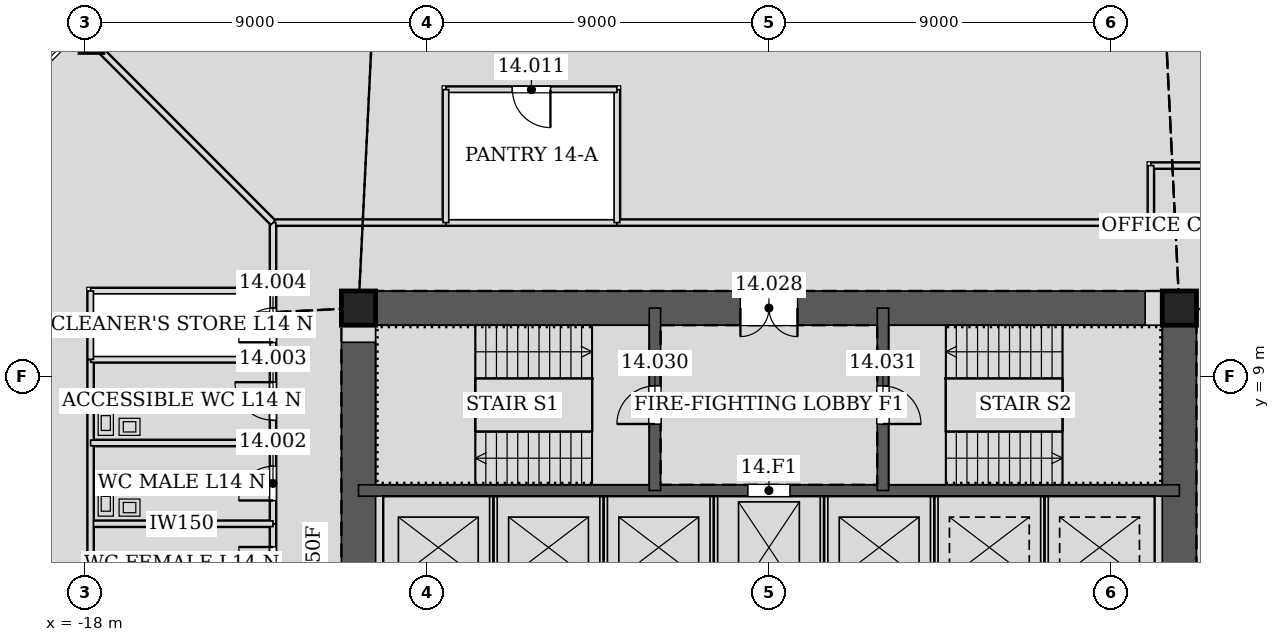
"""IFC4 building model, lengths in metres.
Left out: names, types, materials, properties, quantities, classifications, styles, units other than length and angle.
Written with IfcOpenShell. Run it as: python <this file> out.ifc"""

import sys

from ifc_helpers import new_model, si_unit, direction, frame, frame_2d, origin, origin_2d, place, context, subcontext, project, spatial, rectangle, hollow_rectangle, extrude, element, fill, save


model = new_model("IFC4")
c1 = context("Model", 3, precision=1e-05, world=origin(), true_north=direction((0.0, 1.0)))
c2 = subcontext(c1, "Body", "Model", "MODEL_VIEW")
j1 = project(units=[si_unit("LENGTHUNIT", "METRE"), si_unit("PLANEANGLEUNIT", "RADIAN")], contexts=[c1])
p1 = place(None, origin())
s1 = spatial("IfcSite", under=j1, at=p1, CompositionType="ELEMENT")
p2 = place(p1, origin())
s2 = spatial("IfcBuilding", under=s1, at=p2, CompositionType="ELEMENT")
p3 = place(p2, frame((0.0, 0.0, 66.6)))
s3 = spatial("IfcBuildingStorey", under=s2, at=p3, CompositionType="ELEMENT", Elevation=66.6)
p4 = place(p3, frame((-17.912, 17.912, 0.0), z_axis=(0.020046580746, -0.020046580746, 0.99959805382), x_axis=(0.707106781187, 0.707106781187, 0.0)))
e1 = element("IfcColumn", 1, at=p4, inside=s3, PredefinedType="COLUMN", context=c2, shape_type="SweptSolid", body=[
    extrude(hollow_rectangle(XDim=0.6, YDim=0.6, WallThickness=0.032, at=origin_2d()), origin(), (0.0, 0.0, 1.0), 4.202),
])
for number, where, z_axis, x_axis in (
    (2, (10.8, 10.8, 0.0), (0.0, 0.0, 1.0), (1.0, 0.0, 0.0)),
    (3, (-10.8, 10.8, 0.0), (0.0, 0.0, 1.0), (1.0, 0.0, 0.0)),
):
    element("IfcColumn", number, at=place(p3, frame(where, z_axis=z_axis, x_axis=x_axis)), inside=s3, PredefinedType="COLUMN", context=c2, shape_type="SweptSolid", body=[
        extrude(hollow_rectangle(XDim=0.9, YDim=0.9, WallThickness=0.06, at=origin_2d()), origin(), (0.0, 0.0, 1.0), 4.2),
    ])
p5 = place(p3, frame((10.8, -10.8, 0.0), z_axis=(0.0, 0.0, 1.0), x_axis=(0.0, 1.0, 0.0)))
e4 = element("IfcWall", 4, at=p5, inside=s3, PredefinedType="SOLIDWALL", context=c2, shape_type="SweptSolid", body=[
    extrude(rectangle(XDim=21.6, YDim=0.9, at=frame_2d((10.8, 0.0))), origin(), (0.0, 0.0, 1.0), 4.2),
])
p6 = place(p5, frame((11.7, 0.0, 0.0)))
e5 = element("IfcOpeningElement", 5, at=p6, cuts=e4, PredefinedType="OPENING", context=c2, shape_type="SweptSolid", body=[
    extrude(rectangle(XDim=1.2, YDim=2.1, at=frame_2d((0.6, 1.05))), frame((0.0, 0.46, 0.0), z_axis=(0.0, -1.0, 0.0), x_axis=(1.0, 0.0, 0.0)), (0.0, 0.0, 1.0), 0.92),
])
p7 = place(p5, frame((8.7, 0.0, 0.0)))
e6 = element("IfcOpeningElement", 6, at=p7, cuts=e4, PredefinedType="OPENING", context=c2, shape_type="SweptSolid", body=[
    extrude(rectangle(XDim=1.2, YDim=2.1, at=frame_2d((0.6, 1.05))), frame((0.0, 0.46, 0.0), z_axis=(0.0, -1.0, 0.0), x_axis=(1.0, 0.0, 0.0)), (0.0, 0.0, 1.0), 0.92),
])
p8 = place(p3, frame((10.8, 10.8, 0.0), z_axis=(0.0, 0.0, 1.0), x_axis=(-1.0, 0.0, 0.0)))
e7 = element("IfcWall", 7, at=p8, inside=s3, PredefinedType="SOLIDWALL", context=c2, shape_type="SweptSolid", body=[
    extrude(rectangle(XDim=21.6, YDim=0.9, at=frame_2d((10.8, 0.0))), origin(), (0.0, 0.0, 1.0), 4.2),
])
p9 = place(p8, frame((10.05, 0.0, 0.0)))
e8 = element("IfcOpeningElement", 8, at=p9, cuts=e7, PredefinedType="OPENING", context=c2, shape_type="SweptSolid", body=[
    extrude(rectangle(XDim=1.5, YDim=2.1, at=frame_2d((0.75, 1.05))), frame((0.0, 0.46, 0.0), z_axis=(0.0, -1.0, 0.0), x_axis=(1.0, 0.0, 0.0)), (0.0, 0.0, 1.0), 0.92),
])
p10 = place(p3, frame((-10.8, 10.8, 0.0), z_axis=(0.0, 0.0, 1.0), x_axis=(0.0, -1.0, 0.0)))
e9 = element("IfcWall", 9, at=p10, inside=s3, PredefinedType="SOLIDWALL", context=c2, shape_type="SweptSolid", body=[
    extrude(rectangle(XDim=21.6, YDim=0.9, at=frame_2d((10.8, 0.0))), origin(), (0.0, 0.0, 1.0), 4.2),
])
p11 = place(p10, frame((8.7, 0.0, 0.0)))
e10 = element("IfcOpeningElement", 10, at=p11, cuts=e9, PredefinedType="OPENING", context=c2, shape_type="SweptSolid", body=[
    extrude(rectangle(XDim=1.2, YDim=2.1, at=frame_2d((0.6, 1.05))), frame((0.0, 0.46, 0.0), z_axis=(0.0, -1.0, 0.0), x_axis=(1.0, 0.0, 0.0)), (0.0, 0.0, 1.0), 0.92),
])
p12 = place(p10, frame((11.7, 0.0, 0.0)))
e11 = element("IfcOpeningElement", 11, at=p12, cuts=e9, PredefinedType="OPENING", context=c2, shape_type="SweptSolid", body=[
    extrude(rectangle(XDim=1.2, YDim=2.1, at=frame_2d((0.6, 1.05))), frame((0.0, 0.46, 0.0), z_axis=(0.0, -1.0, 0.0), x_axis=(1.0, 0.0, 0.0)), (0.0, 0.0, 1.0), 0.92),
])
p13 = place(p3, frame((-10.8, 6.0, 0.0), z_axis=(0.0, 0.0, 1.0), x_axis=(1.0, 0.0, 0.0)))
e12 = element("IfcWall", 12, at=p13, inside=s3, PredefinedType="SOLIDWALL", context=c2, shape_type="SweptSolid", body=[
    extrude(rectangle(XDim=21.6, YDim=0.3, at=frame_2d((10.8, 0.0))), origin(), (0.0, 0.0, 1.0), 4.2),
])
p14 = place(p13, frame((10.25, 0.0, 0.0)))
e13 = element("IfcOpeningElement", 13, at=p14, cuts=e12, PredefinedType="OPENING", context=c2, shape_type="SweptSolid", body=[
    extrude(rectangle(XDim=1.1, YDim=2.1, at=frame_2d((0.55, 1.05))), frame((0.0, 0.16, 0.0), z_axis=(0.0, -1.0, 0.0), x_axis=(1.0, 0.0, 0.0)), (0.0, 0.0, 1.0), 0.32),
])
p15 = place(p3, frame((-3.0, 6.0, 0.0), z_axis=(0.0, 0.0, 1.0), x_axis=(0.0, 1.0, 0.0)))
e14 = element("IfcWall", 14, at=p15, inside=s3, PredefinedType="SOLIDWALL", context=c2, shape_type="SweptSolid", body=[
    extrude(rectangle(XDim=4.8, YDim=0.3, at=frame_2d((2.4, 0.0))), origin(), (0.0, 0.0, 1.0), 4.2),
])
p16 = place(p15, frame((1.75, 0.0, 0.0)))
e15 = element("IfcOpeningElement", 15, at=p16, cuts=e14, PredefinedType="OPENING", context=c2, shape_type="SweptSolid", body=[
    extrude(rectangle(XDim=1.0, YDim=2.1, at=frame_2d((0.5, 1.05))), frame((0.0, 0.16, 0.0), z_axis=(0.0, -1.0, 0.0), x_axis=(1.0, 0.0, 0.0)), (0.0, 0.0, 1.0), 0.32),
])
p17 = place(p3, frame((3.0, 6.0, 0.0), z_axis=(0.0, 0.0, 1.0), x_axis=(0.0, 1.0, 0.0)))
e16 = element("IfcWall", 16, at=p17, inside=s3, PredefinedType="SOLIDWALL", context=c2, shape_type="SweptSolid", body=[
    extrude(rectangle(XDim=4.8, YDim=0.3, at=frame_2d((2.4, 0.0))), origin(), (0.0, 0.0, 1.0), 4.2),
])
p18 = place(p17, frame((1.75, 0.0, 0.0)))
e17 = element("IfcOpeningElement", 17, at=p18, cuts=e16, PredefinedType="OPENING", context=c2, shape_type="SweptSolid", body=[
    extrude(rectangle(XDim=1.0, YDim=2.1, at=frame_2d((0.5, 1.05))), frame((0.0, 0.16, 0.0), z_axis=(0.0, -1.0, 0.0), x_axis=(1.0, 0.0, 0.0)), (0.0, 0.0, 1.0), 0.32),
])
p19 = place(p3, frame((-13.05, 5.126, 0.0), z_axis=(0.0, 0.0, 1.0), x_axis=(0.0, -1.0, 0.0)))
e18 = element("IfcWall", 18, at=p19, inside=s3, PredefinedType="PARTITIONING", context=c2, shape_type="SweptSolid", body=[
    extrude(rectangle(XDim=2.127, YDim=0.15, at=frame_2d((1.063, 0.0))), origin(), (0.0, 0.0, 1.0), 4.035),
])
p20 = place(p19, frame((0.614, 0.0, 0.0)))
e19 = element("IfcOpeningElement", 19, at=p20, cuts=e18, PredefinedType="OPENING", context=c2, shape_type="SweptSolid", body=[
    extrude(rectangle(XDim=0.9, YDim=2.1, at=frame_2d((0.45, 1.05))), frame((0.0, 0.085, 0.0), z_axis=(0.0, -1.0, 0.0), x_axis=(1.0, 0.0, 0.0)), (0.0, 0.0, 1.0), 0.17),
])
p21 = place(p3, frame((-13.05, 7.251, 0.0), z_axis=(0.0, 0.0, 1.0), x_axis=(0.0, -1.0, 0.0)))
e20 = element("IfcWall", 20, at=p21, inside=s3, PredefinedType="PARTITIONING", context=c2, shape_type="SweptSolid", body=[
    extrude(rectangle(XDim=2.127, YDim=0.15, at=frame_2d((1.063, 0.0))), origin(), (0.0, 0.0, 1.0), 4.035),
])
p22 = place(p21, frame((0.614, 0.0, 0.0)))
e21 = element("IfcOpeningElement", 21, at=p22, cuts=e20, PredefinedType="OPENING", context=c2, shape_type="SweptSolid", body=[
    extrude(rectangle(XDim=0.9, YDim=2.1, at=frame_2d((0.45, 1.05))), frame((0.0, 0.085, 0.0), z_axis=(0.0, -1.0, 0.0), x_axis=(1.0, 0.0, 0.0)), (0.0, 0.0, 1.0), 0.17),
])
p23 = place(p3, frame((-13.05, 9.451, 0.0), z_axis=(0.0, 0.0, 1.0), x_axis=(0.0, -1.0, 0.0)))
e22 = element("IfcWall", 22, at=p23, inside=s3, PredefinedType="PARTITIONING", context=c2, shape_type="SweptSolid", body=[
    extrude(rectangle(XDim=2.202, YDim=0.15, at=frame_2d((1.101, 0.0))), origin(), (0.0, 0.0, 1.0), 4.035),
])
p24 = place(p23, frame((0.601, 0.0, 0.0)))
e23 = element("IfcOpeningElement", 23, at=p24, cuts=e22, PredefinedType="OPENING", context=c2, shape_type="SweptSolid", body=[
    extrude(rectangle(XDim=1.0, YDim=2.1, at=frame_2d((0.5, 1.05))), frame((0.0, 0.085, 0.0), z_axis=(0.0, -1.0, 0.0), x_axis=(1.0, 0.0, 0.0)), (0.0, 0.0, 1.0), 0.17),
])
p25 = place(p3, frame((-13.05, 11.251, 0.0), z_axis=(0.0, 0.0, 1.0), x_axis=(0.0, -1.0, 0.0)))
e24 = element("IfcWall", 24, at=p25, inside=s3, PredefinedType="PARTITIONING", context=c2, shape_type="SweptSolid", body=[
    extrude(rectangle(XDim=1.802, YDim=0.15, at=frame_2d((0.901, 0.0))), origin(), (0.0, 0.0, 1.0), 3.014),
])
p26 = place(p25, frame((0.451, 0.0, 0.0)))
e25 = element("IfcOpeningElement", 25, at=p26, cuts=e24, PredefinedType="OPENING", context=c2, shape_type="SweptSolid", body=[
    extrude(rectangle(XDim=0.9, YDim=2.1, at=frame_2d((0.45, 1.05))), frame((0.0, 0.085, 0.0), z_axis=(0.0, -1.0, 0.0), x_axis=(1.0, 0.0, 0.0)), (0.0, 0.0, 1.0), 0.17),
])
p27 = place(p3, frame((-3.999, 13.05, 0.0), z_axis=(0.0, 0.0, 1.0), x_axis=(-1.0, 0.0, 0.0)))
e26 = element("IfcWall", 26, at=p27, inside=s3, PredefinedType="PARTITIONING", context=c2, shape_type="SweptSolid", body=[
    extrude(rectangle(XDim=4.502, YDim=0.15, at=frame_2d((2.251, 0.0))), origin(), (0.0, 0.0, 1.0), 4.035),
])
p28 = place(p3, frame((-8.499, 13.05, 0.0), z_axis=(0.0, 0.0, 1.0), x_axis=(-1.0, 0.0, 0.0)))
e27 = element("IfcWall", 27, at=p28, inside=s3, PredefinedType="PARTITIONING", context=c2, shape_type="SweptSolid", body=[
    extrude(rectangle(XDim=4.551, YDim=0.15, at=frame_2d((2.275, 0.0))), origin(), (0.0, 0.0, 1.0), 3.014),
])
p29 = place(p3, frame((14.55, 14.55, 0.0), z_axis=(0.0, 0.0, 1.0), x_axis=(-1.0, 0.0, 0.0)))
e28 = element("IfcWall", 28, at=p29, inside=s3, PredefinedType="PARTITIONING", context=c2, shape_type="SweptSolid", body=[
    extrude(rectangle(XDim=4.5, YDim=0.15, at=frame_2d((2.25, 0.0))), origin(), (0.0, 0.0, 1.0), 3.014),
])
p30 = place(p3, frame((10.05, 14.55, 0.0), z_axis=(0.0, 0.0, 1.0), x_axis=(0.0, -1.0, 0.0)))
e29 = element("IfcWall", 29, at=p30, inside=s3, PredefinedType="PARTITIONING", context=c2, shape_type="SweptSolid", body=[
    extrude(rectangle(XDim=1.5, YDim=0.15, at=frame_2d((0.75, 0.0))), origin(), (0.0, 0.0, 1.0), 3.423),
])
p31 = place(p3, frame((10.05, 13.05, 0.0), z_axis=(0.0, 0.0, 1.0), x_axis=(-1.0, 0.0, 0.0)))
e30 = element("IfcWall", 30, at=p31, inside=s3, PredefinedType="PARTITIONING", context=c2, shape_type="SweptSolid", body=[
    extrude(rectangle(XDim=14.051, YDim=0.15, at=frame_2d((7.025, 0.0))), origin(), (0.0, 0.0, 1.0), 3.065),
])
p32 = place(p3, frame((-13.05, 13.05, 0.0), z_axis=(0.0, 0.0, 1.0), x_axis=(0.0, -1.0, 0.0)))
e31 = element("IfcWall", 31, at=p32, inside=s3, PredefinedType="PARTITIONING", context=c2, shape_type="SweptSolid", body=[
    extrude(rectangle(XDim=1.801, YDim=0.15, at=frame_2d((0.9, 0.0))), origin(), (0.0, 0.0, 1.0), 3.167),
])
p33 = place(p3, frame((-13.05, 5.125, 0.0), z_axis=(0.0, 0.0, 1.0), x_axis=(-1.0, 0.0, 0.0)))
e32 = element("IfcWall", 32, at=p33, inside=s3, PredefinedType="PARTITIONING", context=c2, shape_type="SweptSolid", body=[
    extrude(rectangle(XDim=4.8, YDim=0.15, at=frame_2d((2.4, 0.0))), origin(), (0.0, 0.0, 1.0), 3.423),
])
p34 = place(p3, frame((-17.85, 3.0, 0.0), z_axis=(0.0, 0.0, 1.0), x_axis=(0.0, 1.0, 0.0)))
e33 = element("IfcWall", 33, at=p34, inside=s3, PredefinedType="PARTITIONING", context=c2, shape_type="SweptSolid", body=[
    extrude(rectangle(XDim=6.45, YDim=0.15, at=frame_2d((3.225, 0.0))), origin(), (0.0, 0.0, 1.0), 4.035),
])
for number, where, z_axis, x_axis in (
    (34, (-13.05, 7.25, 0.0), (0.0, 0.0, 1.0), (-1.0, 0.0, 0.0)),
    (35, (-13.05, 9.45, 0.0), (0.0, 0.0, 1.0), (-1.0, 0.0, 0.0)),
):
    element("IfcWall", number, at=place(p3, frame(where, z_axis=z_axis, x_axis=x_axis)), inside=s3, PredefinedType="PARTITIONING", context=c2, shape_type="SweptSolid", body=[
        extrude(rectangle(XDim=4.8, YDim=0.15, at=frame_2d((2.4, 0.0))), origin(), (0.0, 0.0, 1.0), 3.423),
    ])
p35 = place(p3, frame((-13.05, 11.25, 0.0), z_axis=(0.0, 0.0, 1.0), x_axis=(-1.0, 0.0, 0.0)))
e36 = element("IfcWall", 36, at=p35, inside=s3, PredefinedType="PARTITIONING", context=c2, shape_type="SweptSolid", body=[
    extrude(rectangle(XDim=4.8, YDim=0.15, at=frame_2d((2.4, 0.0))), origin(), (0.0, 0.0, 1.0), 3.715),
])
p36 = place(p3, frame((-17.85, 11.25, 0.0), z_axis=(0.0, 0.0, 1.0), x_axis=(0.0, -1.0, 0.0)))
e37 = element("IfcWall", 37, at=p36, inside=s3, PredefinedType="PARTITIONING", context=c2, shape_type="SweptSolid", body=[
    extrude(rectangle(XDim=1.8, YDim=0.15, at=frame_2d((0.9, 0.0))), origin(), (0.0, 0.0, 1.0), 3.014),
])
p37 = place(p3, frame((-4.0, 13.05, 0.0), z_axis=(0.0, 0.0, 1.0), x_axis=(0.0, 1.0, 0.0)))
e38 = element("IfcWall", 38, at=p37, inside=s3, PredefinedType="PARTITIONING", context=c2, shape_type="SweptSolid", body=[
    extrude(rectangle(XDim=3.5, YDim=0.15, at=frame_2d((1.75, 0.0))), origin(), (0.0, 0.0, 1.0), 3.423),
])
p38 = place(p3, frame((-4.0, 16.55, 0.0), z_axis=(0.0, 0.0, 1.0), x_axis=(-1.0, 0.0, 0.0)))
e39 = element("IfcWall", 39, at=p38, inside=s3, PredefinedType="PARTITIONING", context=c2, shape_type="SweptSolid", body=[
    extrude(rectangle(XDim=4.5, YDim=0.15, at=frame_2d((2.25, 0.0))), origin(), (0.0, 0.0, 1.0), 3.497),
])
p39 = place(p38, frame((1.75, 0.0, 0.0)))
e40 = element("IfcOpeningElement", 40, at=p39, cuts=e39, PredefinedType="OPENING", context=c2, shape_type="SweptSolid", body=[
    extrude(rectangle(XDim=1.0, YDim=2.1, at=frame_2d((0.5, 1.05))), frame((0.0, 0.085, 0.0), z_axis=(0.0, -1.0, 0.0), x_axis=(1.0, 0.0, 0.0)), (0.0, 0.0, 1.0), 0.17),
])
p40 = place(p3, frame((-8.5, 16.55, 0.0), z_axis=(0.0, 0.0, 1.0), x_axis=(0.0, -1.0, 0.0)))
e41 = element("IfcWall", 41, at=p40, inside=s3, PredefinedType="PARTITIONING", context=c2, shape_type="SweptSolid", body=[
    extrude(rectangle(XDim=3.5, YDim=0.15, at=frame_2d((1.75, 0.0))), origin(), (0.0, 0.0, 1.0), 3.423),
])
p41 = place(p3, frame((-17.602, 17.602, 0.0), z_axis=(0.0, 0.0, 1.0), x_axis=(0.707106781187, -0.707106781187, 0.0)))
e42 = element("IfcWall", 42, at=p41, inside=s3, PredefinedType="PARTITIONING", context=c2, shape_type="SweptSolid", body=[
    extrude(rectangle(XDim=6.437, YDim=0.15, at=frame_2d((3.219, 0.0))), origin(), (0.0, 0.0, 1.0), 3.167),
])
for number, where, z_axis, x_axis in (
    (43, (-7.25, 3.15, 0.0), (0.0, 0.0, 1.0), (0.0, 1.0, 0.0)),
    (44, (-4.35, 3.15, 0.0), (0.0, 0.0, 1.0), (0.0, 1.0, 0.0)),
    (45, (-1.45, 3.15, 0.0), (0.0, 0.0, 1.0), (0.0, 1.0, 0.0)),
    (46, (1.45, 3.15, 0.0), (0.0, 0.0, 1.0), (0.0, 1.0, 0.0)),
    (47, (4.35, 3.15, 0.0), (0.0, 0.0, 1.0), (0.0, 1.0, 0.0)),
    (48, (7.25, 3.15, 0.0), (0.0, 0.0, 1.0), (0.0, 1.0, 0.0)),
):
    element("IfcWall", number, at=place(p3, frame(where, z_axis=z_axis, x_axis=x_axis)), inside=s3, PredefinedType="PARTITIONING", context=c2, shape_type="SweptSolid", body=[
        extrude(rectangle(XDim=2.7, YDim=0.2, at=frame_2d((1.35, 0.0))), origin(), (0.0, 0.0, 1.0), 4.2),
    ])
p42 = place(p20, frame((0.9, 0.0, 0.0), z_axis=(0.0, 0.0, 1.0), x_axis=(-1.0, 0.0, 0.0)))
e49 = element("IfcDoor", 49, at=p42, inside=s3, OperationType="SINGLE_SWING_RIGHT", PredefinedType="DOOR", context=c2, shape_type="SweptSolid", body=[
    extrude(rectangle(XDim=0.9, YDim=2.1, at=frame_2d((0.45, 1.05))), frame((0.0, 0.025, 0.0), z_axis=(0.0, -1.0, 0.0), x_axis=(1.0, 0.0, 0.0)), (0.0, 0.0, 1.0), 0.05),
])
fill(e19, e49)
p43 = place(p22, frame((0.9, 0.0, 0.0), z_axis=(0.0, 0.0, 1.0), x_axis=(-1.0, 0.0, 0.0)))
e50 = element("IfcDoor", 50, at=p43, inside=s3, OperationType="SINGLE_SWING_LEFT", PredefinedType="DOOR", context=c2, shape_type="SweptSolid", body=[
    extrude(rectangle(XDim=0.9, YDim=2.1, at=frame_2d((0.45, 1.05))), frame((0.0, 0.025, 0.0), z_axis=(0.0, -1.0, 0.0), x_axis=(1.0, 0.0, 0.0)), (0.0, 0.0, 1.0), 0.05),
])
fill(e21, e50)
p44 = place(p24, frame((1.0, 0.0, 0.0), z_axis=(0.0, 0.0, 1.0), x_axis=(-1.0, 0.0, 0.0)))
e51 = element("IfcDoor", 51, at=p44, inside=s3, OperationType="SINGLE_SWING_RIGHT", PredefinedType="DOOR", context=c2, shape_type="SweptSolid", body=[
    extrude(rectangle(XDim=1.0, YDim=2.1, at=frame_2d((0.5, 1.05))), frame((0.0, 0.025, 0.0), z_axis=(0.0, -1.0, 0.0), x_axis=(1.0, 0.0, 0.0)), (0.0, 0.0, 1.0), 0.05),
])
fill(e23, e51)
p45 = place(p26, frame((0.9, 0.0, 0.0), z_axis=(0.0, 0.0, 1.0), x_axis=(-1.0, 0.0, 0.0)))
e52 = element("IfcDoor", 52, at=p45, inside=s3, OperationType="SINGLE_SWING_LEFT", PredefinedType="DOOR", context=c2, shape_type="SweptSolid", body=[
    extrude(rectangle(XDim=0.9, YDim=2.1, at=frame_2d((0.45, 1.05))), frame((0.0, 0.025, 0.0), z_axis=(0.0, -1.0, 0.0), x_axis=(1.0, 0.0, 0.0)), (0.0, 0.0, 1.0), 0.05),
])
fill(e25, e52)
p46 = place(p39, origin())
e53 = element("IfcDoor", 53, at=p46, inside=s3, OperationType="SINGLE_SWING_LEFT", PredefinedType="DOOR", context=c2, shape_type="SweptSolid", body=[
    extrude(rectangle(XDim=1.0, YDim=2.1, at=frame_2d((0.5, 1.05))), frame((0.0, 0.025, 0.0), z_axis=(0.0, -1.0, 0.0), x_axis=(1.0, 0.0, 0.0)), (0.0, 0.0, 1.0), 0.05),
])
fill(e40, e53)
p47 = place(p9, origin())
e54 = element("IfcDoor", 54, at=p47, inside=s3, OperationType="DOUBLE_DOOR_SINGLE_SWING", PredefinedType="DOOR", context=c2, shape_type="SweptSolid", body=[
    extrude(rectangle(XDim=1.5, YDim=2.1, at=frame_2d((0.75, 1.05))), frame((0.0, 0.025, 0.0), z_axis=(0.0, -1.0, 0.0), x_axis=(1.0, 0.0, 0.0)), (0.0, 0.0, 1.0), 0.05),
])
fill(e8, e54)
p48 = place(p16, origin())
e55 = element("IfcDoor", 55, at=p48, inside=s3, OperationType="SINGLE_SWING_LEFT", PredefinedType="DOOR", context=c2, shape_type="SweptSolid", body=[
    extrude(rectangle(XDim=1.0, YDim=2.1, at=frame_2d((0.5, 1.05))), frame((0.0, 0.025, 0.0), z_axis=(0.0, -1.0, 0.0), x_axis=(1.0, 0.0, 0.0)), (0.0, 0.0, 1.0), 0.05),
])
fill(e15, e55)
p49 = place(p18, frame((1.0, 0.0, 0.0), z_axis=(0.0, 0.0, 1.0), x_axis=(-1.0, 0.0, 0.0)))
e56 = element("IfcDoor", 56, at=p49, inside=s3, OperationType="SINGLE_SWING_RIGHT", PredefinedType="DOOR", context=c2, shape_type="SweptSolid", body=[
    extrude(rectangle(XDim=1.0, YDim=2.1, at=frame_2d((0.5, 1.05))), frame((0.0, 0.025, 0.0), z_axis=(0.0, -1.0, 0.0), x_axis=(1.0, 0.0, 0.0)), (0.0, 0.0, 1.0), 0.05),
])
fill(e17, e56)
p50 = place(p14, origin())
e57 = element("IfcDoor", 57, at=p50, inside=s3, OperationType="DOUBLE_DOOR_SLIDING", PredefinedType="DOOR", context=c2, shape_type="SweptSolid", body=[
    extrude(rectangle(XDim=1.1, YDim=2.1, at=frame_2d((0.55, 1.05))), frame((0.0, 0.025, 0.0), z_axis=(0.0, -1.0, 0.0), x_axis=(1.0, 0.0, 0.0)), (0.0, 0.0, 1.0), 0.05),
])
fill(e13, e57)
save(model, sys.argv[1])
